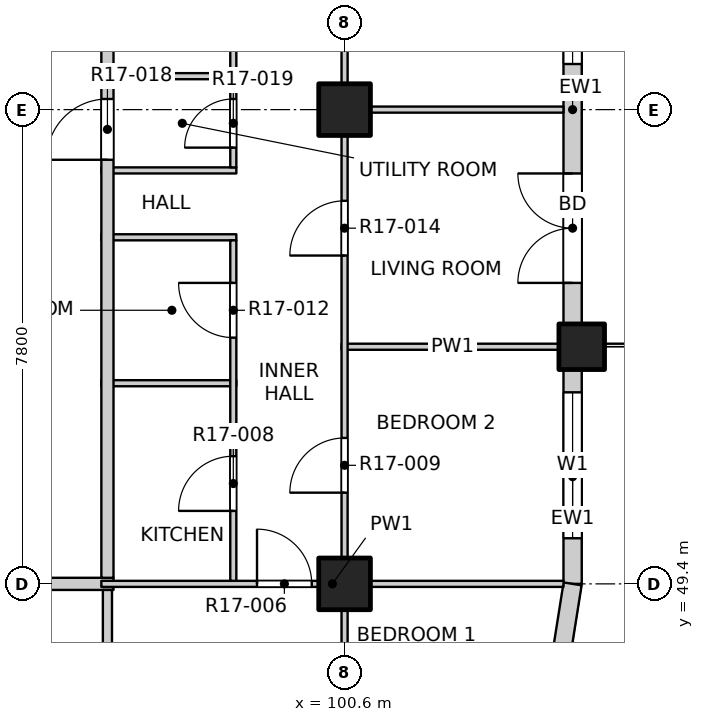
"""IFC4 building model, lengths in metres.
Left out: names, types, materials, properties, quantities, classifications, styles, units other than length and angle.
Written with IfcOpenShell. Run it as: python <this file> out.ifc"""

import sys

from ifc_helpers import new_model, si_unit, direction, frame, frame_2d, origin, origin_2d, place, context, subcontext, project, spatial, rectangle, extrude, element, fill, save


model = new_model("IFC4")
c1 = context("Model", 3, precision=1e-05, world=origin(), true_north=direction((0.0, 1.0)))
c2 = subcontext(c1, "Body", "Model", "MODEL_VIEW")
j1 = project(units=[si_unit("LENGTHUNIT", "METRE"), si_unit("PLANEANGLEUNIT", "RADIAN")], contexts=[c1])
p1 = place(None, origin())
s1 = spatial("IfcSite", under=j1, at=p1, CompositionType="ELEMENT")
p2 = place(p1, origin())
s2 = spatial("IfcBuilding", under=s1, at=p2, CompositionType="ELEMENT")
p3 = place(p2, frame((0.0, 0.0, 182.6)))
s3 = spatial("IfcBuildingStorey", under=s2, at=p3, CompositionType="ELEMENT", Elevation=182.6)
p4 = place(p3, frame((104.5, 53.3, -0.25), z_axis=(0.0, 0.0, 1.0), x_axis=(1.0, 0.0, 0.0)))
e1 = element("IfcColumn", 1, at=p4, inside=s3, PredefinedType="COLUMN", context=c2, shape_type="SweptSolid", body=[
    extrude(rectangle(XDim=0.75, YDim=0.75, at=origin_2d()), origin(), (0.0, 0.0, 1.0), 3.4),
])
for number, where, z_axis, x_axis in (
    (2, (100.6, 49.4, -0.25), (0.0, 0.0, 1.0), (1.0, 0.0, 0.0)),
    (3, (100.6, 57.2, -0.25), (0.0, 0.0, 1.0), (1.0, 0.0, 0.0)),
):
    element("IfcColumn", number, at=place(p3, frame(where, z_axis=z_axis, x_axis=x_axis)), inside=s3, PredefinedType="COLUMN", context=c2, shape_type="SweptSolid", body=[
        extrude(rectangle(XDim=0.85, YDim=0.85, at=origin_2d()), origin(), (0.0, 0.0, 1.0), 3.4),
    ])
p5 = place(p3, frame((104.35, 49.4, 0.0), z_axis=(0.0, 0.0, 1.0), x_axis=(0.0, 1.0, 0.0)))
e4 = element("IfcWall", 4, at=p5, inside=s3, PredefinedType="SOLIDWALL", context=c2, shape_type="SweptSolid", body=[
    extrude(rectangle(XDim=3.525, YDim=0.3, at=frame_2d((1.763, 0.0))), origin(), (0.0, 0.0, 1.0), 2.7),
])
p6 = place(p5, frame((0.75, 0.0, 0.9)))
e5 = element("IfcOpeningElement", 5, at=p6, cuts=e4, PredefinedType="OPENING", context=c2, shape_type="SweptSolid", body=[
    extrude(rectangle(XDim=2.4, YDim=1.8, at=frame_2d((1.2, 0.9))), frame((0.0, 0.16, 0.0), z_axis=(0.0, -1.0, 0.0), x_axis=(1.0, 0.0, 0.0)), (0.0, 0.0, 1.0), 0.32),
])
p7 = place(p3, frame((104.35, 53.675, 0.0), z_axis=(0.0, 0.0, 1.0), x_axis=(0.0, 1.0, 0.0)))
e6 = element("IfcWall", 6, at=p7, inside=s3, PredefinedType="SOLIDWALL", context=c2, shape_type="SweptSolid", body=[
    extrude(rectangle(XDim=7.05, YDim=0.3, at=frame_2d((3.525, 0.0))), origin(), (0.0, 0.0, 1.0), 2.7),
])
p8 = place(p7, frame((0.675, 0.0, 0.0)))
e7 = element("IfcOpeningElement", 7, at=p8, cuts=e6, PredefinedType="OPENING", context=c2, shape_type="SweptSolid", body=[
    extrude(rectangle(XDim=1.8, YDim=2.4, at=frame_2d((0.9, 1.2))), frame((0.0, 0.16, 0.0), z_axis=(0.0, -1.0, 0.0), x_axis=(1.0, 0.0, 0.0)), (0.0, 0.0, 1.0), 0.32),
])
p9 = place(p7, frame((4.275, 0.0, 0.9)))
e8 = element("IfcOpeningElement", 8, at=p9, cuts=e6, PredefinedType="OPENING", context=c2, shape_type="SweptSolid", body=[
    extrude(rectangle(XDim=2.4, YDim=1.8, at=frame_2d((1.2, 0.9))), frame((0.0, 0.16, 0.0), z_axis=(0.0, -1.0, 0.0), x_axis=(1.0, 0.0, 0.0)), (0.0, 0.0, 1.0), 0.32),
])
p10 = place(p3, frame((104.167, 48.241, 0.0), z_axis=(0.0, 0.0, 1.0), x_axis=(0.156496880861, 0.987678452879, 0.0)))
e9 = element("IfcWall", 9, at=p10, inside=s3, PredefinedType="SOLIDWALL", context=c2, shape_type="SweptSolid", body=[
    extrude(rectangle(XDim=1.173, YDim=0.3, at=frame_2d((0.586, 0.0))), origin(), (0.0, 0.0, 1.0), 2.7),
])
p11 = place(p3, frame((73.2, 49.4, 0.0), z_axis=(0.0, 0.0, 1.0), x_axis=(1.0, 0.0, 0.0)))
e10 = element("IfcWall", 10, at=p11, inside=s3, PredefinedType="PARTITIONING", context=c2, shape_type="SweptSolid", body=[
    extrude(rectangle(XDim=23.6, YDim=0.2, at=frame_2d((11.8, 0.0))), origin(), (0.0, 0.0, 1.0), 3.15),
])
p12 = place(p11, frame((7.3, 0.0, 0.0)))
e11 = element("IfcOpeningElement", 11, at=p12, cuts=e10, PredefinedType="OPENING", context=c2, shape_type="SweptSolid", body=[
    extrude(rectangle(XDim=1.2, YDim=2.1, at=frame_2d((0.6, 1.05))), frame((0.0, 0.11, 0.0), z_axis=(0.0, -1.0, 0.0), x_axis=(1.0, 0.0, 0.0)), (0.0, 0.0, 1.0), 0.22),
])
p13 = place(p11, frame((20.125, 0.0, 0.0)))
e12 = element("IfcOpeningElement", 12, at=p13, cuts=e10, PredefinedType="OPENING", context=c2, shape_type="SweptSolid", body=[
    extrude(rectangle(XDim=1.2, YDim=2.1, at=frame_2d((0.6, 1.05))), frame((0.0, 0.11, 0.0), z_axis=(0.0, -1.0, 0.0), x_axis=(1.0, 0.0, 0.0)), (0.0, 0.0, 1.0), 0.22),
])
p14 = place(p3, frame((96.6, 49.4, 0.0), z_axis=(0.0, 0.0, 1.0), x_axis=(1.0, 0.0, 0.0)))
e13 = element("IfcWall", 13, at=p14, inside=s3, PredefinedType="PARTITIONING", context=c2, shape_type="SweptSolid", body=[
    extrude(rectangle(XDim=7.6, YDim=0.1, at=frame_2d((3.8, 0.0))), origin(), (0.0, 0.0, 1.0), 3.15),
])
p15 = place(p14, frame((2.56, 0.0, 0.0)))
e14 = element("IfcOpeningElement", 14, at=p15, cuts=e13, PredefinedType="OPENING", context=c2, shape_type="SweptSolid", body=[
    extrude(rectangle(XDim=0.9, YDim=2.1, at=frame_2d((0.45, 1.05))), frame((0.0, 0.06, 0.0), z_axis=(0.0, -1.0, 0.0), x_axis=(1.0, 0.0, 0.0)), (0.0, 0.0, 1.0), 0.12),
])
p16 = place(p3, frame((96.6, 52.7, 0.0), z_axis=(0.0, 0.0, 1.0), x_axis=(1.0, 0.0, 0.0)))
e15 = element("IfcWall", 15, at=p16, inside=s3, PredefinedType="PARTITIONING", context=c2, shape_type="SweptSolid", body=[
    extrude(rectangle(XDim=2.22, YDim=0.1, at=frame_2d((1.11, 0.0))), origin(), (0.0, 0.0, 1.0), 3.15),
])
p17 = place(p3, frame((100.55, 53.3, 0.0), z_axis=(0.0, 0.0, 1.0), x_axis=(1.0, 0.0, 0.0)))
e16 = element("IfcWall", 16, at=p17, inside=s3, PredefinedType="PARTITIONING", context=c2, shape_type="SweptSolid", body=[
    extrude(rectangle(XDim=3.65, YDim=0.1, at=frame_2d((1.825, 0.0))), origin(), (0.0, 0.0, 1.0), 3.15),
])
for number, where, z_axis, x_axis in (
    (17, (96.6, 55.1, 0.0), (0.0, 0.0, 1.0), (1.0, 0.0, 0.0)),
    (18, (96.6, 56.2, 0.0), (0.0, 0.0, 1.0), (1.0, 0.0, 0.0)),
):
    element("IfcWall", number, at=place(p3, frame(where, z_axis=z_axis, x_axis=x_axis)), inside=s3, PredefinedType="PARTITIONING", context=c2, shape_type="SweptSolid", body=[
        extrude(rectangle(XDim=2.22, YDim=0.1, at=frame_2d((1.11, 0.0))), origin(), (0.0, 0.0, 1.0), 3.15),
    ])
p18 = place(p3, frame((100.55, 57.2, 0.0), z_axis=(0.0, 0.0, 1.0), x_axis=(1.0, 0.0, 0.0)))
e19 = element("IfcWall", 19, at=p18, inside=s3, PredefinedType="PARTITIONING", context=c2, shape_type="SweptSolid", body=[
    extrude(rectangle(XDim=3.65, YDim=0.1, at=frame_2d((1.825, 0.0))), origin(), (0.0, 0.0, 1.0), 3.15),
])
p19 = place(p3, frame((96.6, 57.75, 0.0), z_axis=(0.0, 0.0, 1.0), x_axis=(1.0, 0.0, 0.0)))
e20 = element("IfcWall", 20, at=p19, inside=s3, PredefinedType="PARTITIONING", context=c2, shape_type="SweptSolid", body=[
    extrude(rectangle(XDim=2.22, YDim=0.1, at=frame_2d((1.11, 0.0))), origin(), (0.0, 0.0, 1.0), 3.15),
])
p20 = place(p3, frame((96.7, 45.8, 0.0), z_axis=(0.0, 0.0, 1.0), x_axis=(0.0, 1.0, 0.0)))
e21 = element("IfcWall", 21, at=p20, inside=s3, PredefinedType="PARTITIONING", context=c2, shape_type="SweptSolid", body=[
    extrude(rectangle(XDim=3.5, YDim=0.15, at=frame_2d((1.75, 0.0))), origin(), (0.0, 0.0, 1.0), 3.15),
])
p21 = place(p3, frame((96.7, 49.5, 0.0), z_axis=(0.0, 0.0, 1.0), x_axis=(0.0, 1.0, 0.0)))
e22 = element("IfcWall", 22, at=p21, inside=s3, PredefinedType="PARTITIONING", context=c2, shape_type="SweptSolid", body=[
    extrude(rectangle(XDim=34.7, YDim=0.2, at=frame_2d((17.35, 0.0))), origin(), (0.0, 0.0, 1.0), 3.15),
])
p22 = place(p21, frame((6.875, 0.0, 0.0)))
e23 = element("IfcOpeningElement", 23, at=p22, cuts=e22, PredefinedType="OPENING", context=c2, shape_type="SweptSolid", body=[
    extrude(rectangle(XDim=1.0, YDim=2.1, at=frame_2d((0.5, 1.05))), frame((0.0, 0.11, 0.0), z_axis=(0.0, -1.0, 0.0), x_axis=(1.0, 0.0, 0.0)), (0.0, 0.0, 1.0), 0.22),
])
p23 = place(p21, frame((21.775, 0.0, 0.0)))
e24 = element("IfcOpeningElement", 24, at=p23, cuts=e22, PredefinedType="OPENING", context=c2, shape_type="SweptSolid", body=[
    extrude(rectangle(XDim=1.0, YDim=2.1, at=frame_2d((0.5, 1.05))), frame((0.0, 0.11, 0.0), z_axis=(0.0, -1.0, 0.0), x_axis=(1.0, 0.0, 0.0)), (0.0, 0.0, 1.0), 0.22),
])
p24 = place(p21, frame((27.725, 0.0, 0.0)))
e25 = element("IfcOpeningElement", 25, at=p24, cuts=e22, PredefinedType="OPENING", context=c2, shape_type="SweptSolid", body=[
    extrude(rectangle(XDim=1.0, YDim=2.1, at=frame_2d((0.5, 1.05))), frame((0.0, 0.11, 0.0), z_axis=(0.0, -1.0, 0.0), x_axis=(1.0, 0.0, 0.0)), (0.0, 0.0, 1.0), 0.22),
])
p25 = place(p3, frame((98.77, 49.45, 0.0), z_axis=(0.0, 0.0, 1.0), x_axis=(0.0, 1.0, 0.0)))
e26 = element("IfcWall", 26, at=p25, inside=s3, PredefinedType="PARTITIONING", context=c2, shape_type="SweptSolid", body=[
    extrude(rectangle(XDim=5.6, YDim=0.1, at=frame_2d((2.8, 0.0))), origin(), (0.0, 0.0, 1.0), 3.15),
])
p26 = place(p25, frame((1.15, 0.0, 0.0)))
e27 = element("IfcOpeningElement", 27, at=p26, cuts=e26, PredefinedType="OPENING", context=c2, shape_type="SweptSolid", body=[
    extrude(rectangle(XDim=0.9, YDim=2.1, at=frame_2d((0.45, 1.05))), frame((0.0, 0.06, 0.0), z_axis=(0.0, -1.0, 0.0), x_axis=(1.0, 0.0, 0.0)), (0.0, 0.0, 1.0), 0.12),
])
p27 = place(p25, frame((4.0, 0.0, 0.0)))
e28 = element("IfcOpeningElement", 28, at=p27, cuts=e26, PredefinedType="OPENING", context=c2, shape_type="SweptSolid", body=[
    extrude(rectangle(XDim=0.9, YDim=2.1, at=frame_2d((0.45, 1.05))), frame((0.0, 0.06, 0.0), z_axis=(0.0, -1.0, 0.0), x_axis=(1.0, 0.0, 0.0)), (0.0, 0.0, 1.0), 0.12),
])
p28 = place(p3, frame((98.77, 56.25, 0.0), z_axis=(0.0, 0.0, 1.0), x_axis=(0.0, 1.0, 0.0)))
e29 = element("IfcWall", 29, at=p28, inside=s3, PredefinedType="PARTITIONING", context=c2, shape_type="SweptSolid", body=[
    extrude(rectangle(XDim=13.7, YDim=0.1, at=frame_2d((6.85, 0.0))), origin(), (0.0, 0.0, 1.0), 3.15),
])
p29 = place(p28, frame((0.325, 0.0, 0.0)))
e30 = element("IfcOpeningElement", 30, at=p29, cuts=e29, PredefinedType="OPENING", context=c2, shape_type="SweptSolid", body=[
    extrude(rectangle(XDim=0.8, YDim=2.1, at=frame_2d((0.4, 1.05))), frame((0.0, 0.06, 0.0), z_axis=(0.0, -1.0, 0.0), x_axis=(1.0, 0.0, 0.0)), (0.0, 0.0, 1.0), 0.12),
])
p30 = place(p28, frame((1.95, 0.0, 0.0)))
e31 = element("IfcOpeningElement", 31, at=p30, cuts=e29, PredefinedType="OPENING", context=c2, shape_type="SweptSolid", body=[
    extrude(rectangle(XDim=0.9, YDim=2.1, at=frame_2d((0.45, 1.05))), frame((0.0, 0.06, 0.0), z_axis=(0.0, -1.0, 0.0), x_axis=(1.0, 0.0, 0.0)), (0.0, 0.0, 1.0), 0.12),
])
p31 = place(p28, frame((3.675, 0.0, 0.0)))
e32 = element("IfcOpeningElement", 32, at=p31, cuts=e29, PredefinedType="OPENING", context=c2, shape_type="SweptSolid", body=[
    extrude(rectangle(XDim=0.8, YDim=2.1, at=frame_2d((0.4, 1.05))), frame((0.0, 0.06, 0.0), z_axis=(0.0, -1.0, 0.0), x_axis=(1.0, 0.0, 0.0)), (0.0, 0.0, 1.0), 0.12),
])
p32 = place(p28, frame((6.16, 0.0, 0.0)))
e33 = element("IfcOpeningElement", 33, at=p32, cuts=e29, PredefinedType="OPENING", context=c2, shape_type="SweptSolid", body=[
    extrude(rectangle(XDim=0.9, YDim=2.1, at=frame_2d((0.45, 1.05))), frame((0.0, 0.06, 0.0), z_axis=(0.0, -1.0, 0.0), x_axis=(1.0, 0.0, 0.0)), (0.0, 0.0, 1.0), 0.12),
])
p33 = place(p28, frame((9.42, 0.0, 0.0)))
e34 = element("IfcOpeningElement", 34, at=p33, cuts=e29, PredefinedType="OPENING", context=c2, shape_type="SweptSolid", body=[
    extrude(rectangle(XDim=0.8, YDim=2.1, at=frame_2d((0.4, 1.05))), frame((0.0, 0.06, 0.0), z_axis=(0.0, -1.0, 0.0), x_axis=(1.0, 0.0, 0.0)), (0.0, 0.0, 1.0), 0.12),
])
p34 = place(p28, frame((12.06, 0.0, 0.0)))
e35 = element("IfcOpeningElement", 35, at=p34, cuts=e29, PredefinedType="OPENING", context=c2, shape_type="SweptSolid", body=[
    extrude(rectangle(XDim=0.9, YDim=2.1, at=frame_2d((0.45, 1.05))), frame((0.0, 0.06, 0.0), z_axis=(0.0, -1.0, 0.0), x_axis=(1.0, 0.0, 0.0)), (0.0, 0.0, 1.0), 0.12),
])
p35 = place(p3, frame((100.6, 45.8, 0.0), z_axis=(0.0, 0.0, 1.0), x_axis=(0.0, 1.0, 0.0)))
e36 = element("IfcWall", 36, at=p35, inside=s3, PredefinedType="PARTITIONING", context=c2, shape_type="SweptSolid", body=[
    extrude(rectangle(XDim=38.4, YDim=0.1, at=frame_2d((19.2, 0.0))), origin(), (0.0, 0.0, 1.0), 3.15),
])
p36 = place(p35, frame((1.05, 0.0, 0.0)))
e37 = element("IfcOpeningElement", 37, at=p36, cuts=e36, PredefinedType="OPENING", context=c2, shape_type="SweptSolid", body=[
    extrude(rectangle(XDim=1.2, YDim=2.1, at=frame_2d((0.6, 1.05))), frame((0.0, 0.06, 0.0), z_axis=(0.0, -1.0, 0.0), x_axis=(1.0, 0.0, 0.0)), (0.0, 0.0, 1.0), 0.12),
])
p37 = place(p35, frame((5.1, 0.0, 0.0)))
e38 = element("IfcOpeningElement", 38, at=p37, cuts=e36, PredefinedType="OPENING", context=c2, shape_type="SweptSolid", body=[
    extrude(rectangle(XDim=0.9, YDim=2.1, at=frame_2d((0.45, 1.05))), frame((0.0, 0.06, 0.0), z_axis=(0.0, -1.0, 0.0), x_axis=(1.0, 0.0, 0.0)), (0.0, 0.0, 1.0), 0.12),
])
p38 = place(p35, frame((9.0, 0.0, 0.0)))
e39 = element("IfcOpeningElement", 39, at=p38, cuts=e36, PredefinedType="OPENING", context=c2, shape_type="SweptSolid", body=[
    extrude(rectangle(XDim=0.9, YDim=2.1, at=frame_2d((0.45, 1.05))), frame((0.0, 0.06, 0.0), z_axis=(0.0, -1.0, 0.0), x_axis=(1.0, 0.0, 0.0)), (0.0, 0.0, 1.0), 0.12),
])
p39 = place(p35, frame((12.9, 0.0, 0.0)))
e40 = element("IfcOpeningElement", 40, at=p39, cuts=e36, PredefinedType="OPENING", context=c2, shape_type="SweptSolid", body=[
    extrude(rectangle(XDim=0.9, YDim=2.1, at=frame_2d((0.45, 1.05))), frame((0.0, 0.06, 0.0), z_axis=(0.0, -1.0, 0.0), x_axis=(1.0, 0.0, 0.0)), (0.0, 0.0, 1.0), 0.12),
])
p40 = place(p35, frame((19.725, 0.0, 0.0)))
e41 = element("IfcOpeningElement", 41, at=p40, cuts=e36, PredefinedType="OPENING", context=c2, shape_type="SweptSolid", body=[
    extrude(rectangle(XDim=1.2, YDim=2.1, at=frame_2d((0.6, 1.05))), frame((0.0, 0.06, 0.0), z_axis=(0.0, -1.0, 0.0), x_axis=(1.0, 0.0, 0.0)), (0.0, 0.0, 1.0), 0.12),
])
p41 = place(p35, frame((24.6, 0.0, 0.0)))
e42 = element("IfcOpeningElement", 42, at=p41, cuts=e36, PredefinedType="OPENING", context=c2, shape_type="SweptSolid", body=[
    extrude(rectangle(XDim=0.9, YDim=2.1, at=frame_2d((0.45, 1.05))), frame((0.0, 0.06, 0.0), z_axis=(0.0, -1.0, 0.0), x_axis=(1.0, 0.0, 0.0)), (0.0, 0.0, 1.0), 0.12),
])
p42 = place(p35, frame((28.5, 0.0, 0.0)))
e43 = element("IfcOpeningElement", 43, at=p42, cuts=e36, PredefinedType="OPENING", context=c2, shape_type="SweptSolid", body=[
    extrude(rectangle(XDim=0.9, YDim=2.1, at=frame_2d((0.45, 1.05))), frame((0.0, 0.06, 0.0), z_axis=(0.0, -1.0, 0.0), x_axis=(1.0, 0.0, 0.0)), (0.0, 0.0, 1.0), 0.12),
])
p43 = place(p35, frame((32.4, 0.0, 0.0)))
e44 = element("IfcOpeningElement", 44, at=p43, cuts=e36, PredefinedType="OPENING", context=c2, shape_type="SweptSolid", body=[
    extrude(rectangle(XDim=0.9, YDim=2.1, at=frame_2d((0.45, 1.05))), frame((0.0, 0.06, 0.0), z_axis=(0.0, -1.0, 0.0), x_axis=(1.0, 0.0, 0.0)), (0.0, 0.0, 1.0), 0.12),
])
p44 = place(p35, frame((36.15, 0.0, 0.0)))
e45 = element("IfcOpeningElement", 45, at=p44, cuts=e36, PredefinedType="OPENING", context=c2, shape_type="SweptSolid", body=[
    extrude(rectangle(XDim=1.2, YDim=2.1, at=frame_2d((0.6, 1.05))), frame((0.0, 0.06, 0.0), z_axis=(0.0, -1.0, 0.0), x_axis=(1.0, 0.0, 0.0)), (0.0, 0.0, 1.0), 0.12),
])
p45 = place(p6, origin())
e46 = element("IfcWindow", 46, at=p45, inside=s3, PartitioningType="DOUBLE_PANEL_VERTICAL", PredefinedType="WINDOW", context=c2, shape_type="SweptSolid", body=[
    extrude(rectangle(XDim=2.4, YDim=1.8, at=frame_2d((1.2, 0.9))), frame((0.0, 0.03, 0.0), z_axis=(0.0, -1.0, 0.0), x_axis=(1.0, 0.0, 0.0)), (0.0, 0.0, 1.0), 0.06),
])
fill(e5, e46)
p46 = place(p8, origin())
e47 = element("IfcDoor", 47, at=p46, inside=s3, OperationType="DOUBLE_DOOR_SINGLE_SWING", PredefinedType="DOOR", context=c2, shape_type="SweptSolid", body=[
    extrude(rectangle(XDim=1.8, YDim=2.4, at=frame_2d((0.9, 1.2))), frame((0.0, 0.025, 0.0), z_axis=(0.0, -1.0, 0.0), x_axis=(1.0, 0.0, 0.0)), (0.0, 0.0, 1.0), 0.05),
])
fill(e7, e47)
p47 = place(p9, origin())
e48 = element("IfcWindow", 48, at=p47, inside=s3, PartitioningType="DOUBLE_PANEL_VERTICAL", PredefinedType="WINDOW", context=c2, shape_type="SweptSolid", body=[
    extrude(rectangle(XDim=2.4, YDim=1.8, at=frame_2d((1.2, 0.9))), frame((0.0, 0.03, 0.0), z_axis=(0.0, -1.0, 0.0), x_axis=(1.0, 0.0, 0.0)), (0.0, 0.0, 1.0), 0.06),
])
fill(e8, e48)
p48 = place(p15, origin())
e49 = element("IfcDoor", 49, at=p48, inside=s3, OperationType="SINGLE_SWING_LEFT", PredefinedType="DOOR", context=c2, shape_type="SweptSolid", body=[
    extrude(rectangle(XDim=0.9, YDim=2.1, at=frame_2d((0.45, 1.05))), frame((0.0, 0.025, 0.0), z_axis=(0.0, -1.0, 0.0), x_axis=(1.0, 0.0, 0.0)), (0.0, 0.0, 1.0), 0.05),
])
fill(e14, e49)
p49 = place(p26, origin())
e50 = element("IfcDoor", 50, at=p49, inside=s3, OperationType="SINGLE_SWING_LEFT", PredefinedType="DOOR", context=c2, shape_type="SweptSolid", body=[
    extrude(rectangle(XDim=0.9, YDim=2.1, at=frame_2d((0.45, 1.05))), frame((0.0, 0.025, 0.0), z_axis=(0.0, -1.0, 0.0), x_axis=(1.0, 0.0, 0.0)), (0.0, 0.0, 1.0), 0.05),
])
fill(e27, e50)
p50 = place(p37, origin())
e51 = element("IfcDoor", 51, at=p50, inside=s3, OperationType="SINGLE_SWING_LEFT", PredefinedType="DOOR", context=c2, shape_type="SweptSolid", body=[
    extrude(rectangle(XDim=0.9, YDim=2.1, at=frame_2d((0.45, 1.05))), frame((0.0, 0.025, 0.0), z_axis=(0.0, -1.0, 0.0), x_axis=(1.0, 0.0, 0.0)), (0.0, 0.0, 1.0), 0.05),
])
fill(e38, e51)
p51 = place(p27, origin())
e52 = element("IfcDoor", 52, at=p51, inside=s3, OperationType="SINGLE_SWING_RIGHT", PredefinedType="DOOR", context=c2, shape_type="SweptSolid", body=[
    extrude(rectangle(XDim=0.9, YDim=2.1, at=frame_2d((0.45, 1.05))), frame((0.0, 0.025, 0.0), z_axis=(0.0, -1.0, 0.0), x_axis=(1.0, 0.0, 0.0)), (0.0, 0.0, 1.0), 0.05),
])
fill(e28, e52)
p52 = place(p38, origin())
e53 = element("IfcDoor", 53, at=p52, inside=s3, OperationType="SINGLE_SWING_LEFT", PredefinedType="DOOR", context=c2, shape_type="SweptSolid", body=[
    extrude(rectangle(XDim=0.9, YDim=2.1, at=frame_2d((0.45, 1.05))), frame((0.0, 0.025, 0.0), z_axis=(0.0, -1.0, 0.0), x_axis=(1.0, 0.0, 0.0)), (0.0, 0.0, 1.0), 0.05),
])
fill(e39, e53)
p53 = place(p22, origin())
e54 = element("IfcDoor", 54, at=p53, inside=s3, OperationType="SINGLE_SWING_LEFT", PredefinedType="DOOR", context=c2, shape_type="SweptSolid", body=[
    extrude(rectangle(XDim=1.0, YDim=2.1, at=frame_2d((0.5, 1.05))), frame((0.0, 0.025, 0.0), z_axis=(0.0, -1.0, 0.0), x_axis=(1.0, 0.0, 0.0)), (0.0, 0.0, 1.0), 0.05),
])
fill(e23, e54)
p54 = place(p29, origin())
e55 = element("IfcDoor", 55, at=p54, inside=s3, OperationType="SINGLE_SWING_LEFT", PredefinedType="DOOR", context=c2, shape_type="SweptSolid", body=[
    extrude(rectangle(XDim=0.8, YDim=2.1, at=frame_2d((0.4, 1.05))), frame((0.0, 0.025, 0.0), z_axis=(0.0, -1.0, 0.0), x_axis=(1.0, 0.0, 0.0)), (0.0, 0.0, 1.0), 0.05),
])
fill(e30, e55)
save(model, sys.argv[1])
